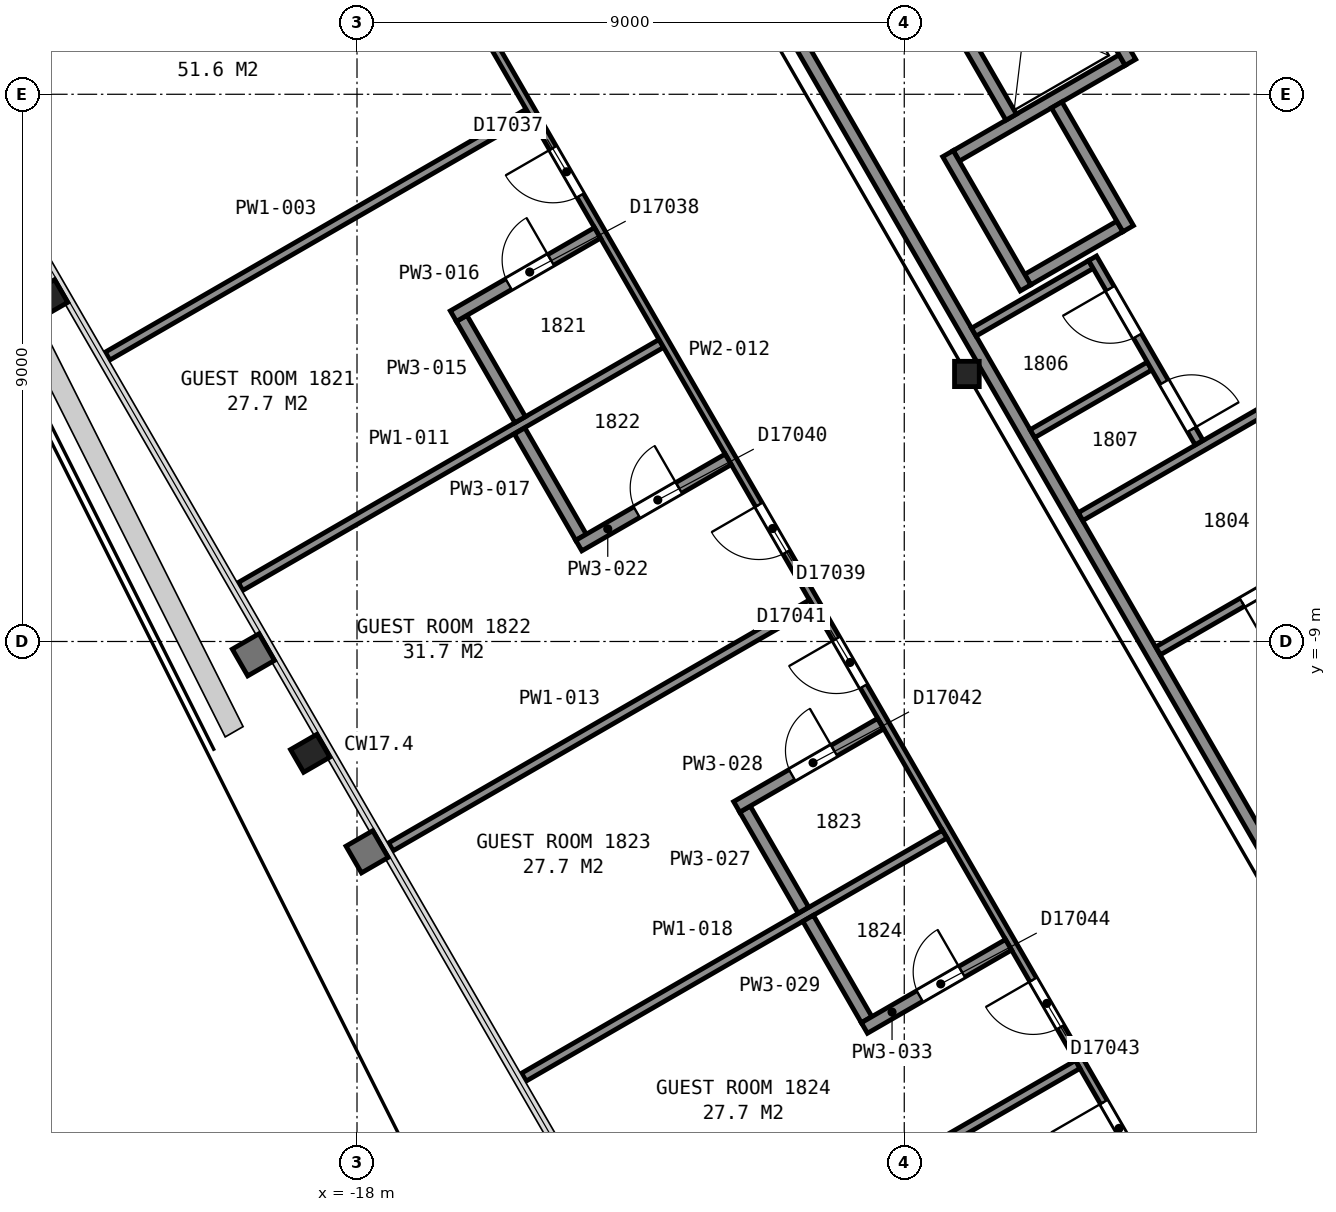
"""IFC4 building model, lengths in metres.
Left out: names, types, materials, properties, quantities, classifications, styles, units other than length and angle.
Written with IfcOpenShell. Run it as: python <this file> out.ifc"""

import sys

from ifc_helpers import new_model, si_unit, direction, frame, frame_2d, origin, origin_2d, place, context, subcontext, project, spatial, rectangle, i_section, extrude, element, fill, save


model = new_model("IFC4")
c1 = context("Model", 3, precision=1e-05, world=origin(), true_north=direction((0.0, 1.0)))
c2 = subcontext(c1, "Body", "Model", "MODEL_VIEW")
j1 = project(units=[si_unit("LENGTHUNIT", "METRE"), si_unit("PLANEANGLEUNIT", "RADIAN")], contexts=[c1])
p1 = place(None, origin())
s1 = spatial("IfcSite", under=j1, at=p1, CompositionType="ELEMENT")
p2 = place(p1, origin())
s2 = spatial("IfcBuilding", under=s1, at=p2, CompositionType="ELEMENT")
p3 = place(p2, frame((0.0, 0.0, 80.0)))
s3 = spatial("IfcBuildingStorey", under=s2, at=p3, CompositionType="ELEMENT", Elevation=80.0)
for number, where, z_axis, x_axis in (
    (1, (-23.08, -3.36, 0.0), (0.0, 0.0, 1.0), (-0.5, 0.866, 0.0)),
    (2, (-18.77, -10.84, 0.0), (0.0, 0.0, 1.0), (-0.5, 0.866, 0.0)),
):
    element("IfcColumn", number, at=place(p3, frame(where, z_axis=z_axis, x_axis=x_axis)), inside=s3, PredefinedType="COLUMN", context=c2, shape_type="SweptSolid", body=[
        extrude(i_section(OverallWidth=0.432, OverallDepth=0.498, WebThickness=0.056, FlangeThickness=0.089, FilletRadius=0.015, at=origin_2d()), origin(), (0.0, 0.0, 1.0), 3.6),
    ])
p4 = place(p3, frame((-7.97, -4.6, 0.0), z_axis=(0.0, 0.0, 1.0), x_axis=(1.0, 0.0, 0.0)))
e3 = element("IfcColumn", 3, at=p4, inside=s3, PredefinedType="COLUMN", context=c2, shape_type="SweptSolid", body=[
    extrude(i_section(OverallWidth=0.406, OverallDepth=0.417, WebThickness=0.03, FlangeThickness=0.048, FilletRadius=0.015, at=origin_2d()), origin(), (0.0, 0.0, 1.0), 3.6),
])
p5 = place(p3, frame((-6.97, -3.048, 0.0), z_axis=(0.0, 0.0, 1.0), x_axis=(0.866036909293, 0.499980071345, 0.0)))
e4 = element("IfcWall", 4, at=p5, inside=s3, PredefinedType="PARTITIONING", context=c2, shape_type="SweptSolid", body=[
    extrude(rectangle(XDim=1.75, YDim=0.2, at=frame_2d((0.875, 0.0))), origin(), (0.0, 0.0, 1.0), 3.6),
])
p6 = place(p3, frame((-8.145, -1.013, 0.0), z_axis=(0.0, 0.0, 1.0), x_axis=(0.866016494683, 0.500015430699, 0.0)))
e5 = element("IfcWall", 5, at=p6, inside=s3, PredefinedType="PARTITIONING", context=c2, shape_type="SweptSolid", body=[
    extrude(rectangle(XDim=3.15, YDim=0.2, at=frame_2d((1.575, 0.0))), origin(), (0.0, 0.0, 1.0), 3.6),
])
p7 = place(p3, frame((-5.28, 0.525, 0.0), z_axis=(0.0, 0.0, 1.0), x_axis=(-0.500037662692, 0.866003658127, 0.0)))
e6 = element("IfcWall", 6, at=p7, inside=s3, PredefinedType="PARTITIONING", context=c2, shape_type="SweptSolid", body=[
    extrude(rectangle(XDim=2.95, YDim=0.2, at=frame_2d((1.475, 0.0))), origin(), (0.0, 0.0, 1.0), 3.6),
])
p8 = place(p7, frame((0.925, 0.0, 0.0)))
e7 = element("IfcOpeningElement", 7, at=p8, cuts=e6, PredefinedType="OPENING", context=c2, shape_type="SweptSolid", body=[
    extrude(rectangle(XDim=1.1, YDim=2.1, at=frame_2d((0.55, 1.05))), frame((0.0, 0.11, 0.0), z_axis=(0.0, -1.0, 0.0), x_axis=(1.0, 0.0, 0.0)), (0.0, 0.0, 1.0), 0.22),
])
p9 = place(p3, frame((-5.318, -2.21, 0.0), z_axis=(0.0, 0.0, 1.0), x_axis=(-0.499938297808, 0.866061024631, 0.0)))
e8 = element("IfcWall", 8, at=p9, inside=s3, PredefinedType="PARTITIONING", context=c2, shape_type="SweptSolid", body=[
    extrude(rectangle(XDim=2.35, YDim=0.2, at=frame_2d((1.175, 0.0))), origin(), (0.0, 0.0, 1.0), 3.6),
])
p10 = place(p3, frame((-7.242, -0.376, 0.0), z_axis=(0.0, 0.0, 1.0), x_axis=(-0.499996545922, 0.866027397988, 0.0)))
e9 = element("IfcWall", 9, at=p10, inside=s3, PredefinedType="PARTITIONING", context=c2, shape_type="SweptSolid", body=[
    extrude(rectangle(XDim=2.75, YDim=0.2, at=frame_2d((1.375, 0.0))), origin(), (0.0, 0.0, 1.0), 3.6),
])
p11 = place(p3, frame((-7.006, -3.185, 0.0), z_axis=(0.0, 0.0, 1.0), x_axis=(-0.499990435942, 0.866030925526, 0.0)))
e10 = element("IfcWall", 10, at=p11, inside=s3, PredefinedType="PARTITIONING", context=c2, shape_type="SweptSolid", body=[
    extrude(rectangle(XDim=2.55, YDim=0.2, at=frame_2d((1.275, 0.0))), origin(), (0.0, 0.0, 1.0), 3.6),
])
p12 = place(p3, frame((-13.664, 5.946, 0.0), z_axis=(0.0, 0.0, 1.0), x_axis=(0.499994327219, -0.866028678941, 0.0)))
e11 = element("IfcWall", 11, at=p12, inside=s3, PredefinedType="PARTITIONING", context=c2, shape_type="SweptSolid", body=[
    extrude(rectangle(XDim=23.968, YDim=0.2, at=frame_2d((11.984, 0.0))), origin(), (0.0, 0.0, 1.0), 3.35),
])
p13 = place(p3, frame((-7.856, -3.912, 0.0), z_axis=(0.0, 0.0, 1.0), x_axis=(0.865971748, 0.500092923031, 0.0)))
e12 = element("IfcWall", 12, at=p13, inside=s3, PredefinedType="PARTITIONING", context=c2, shape_type="SweptSolid", body=[
    extrude(rectangle(XDim=2.225, YDim=0.15, at=frame_2d((1.112, 0.0))), origin(), (0.0, 0.0, 1.0), 3.35),
])
p14 = place(p3, frame((-6.892, -5.582, 0.0), z_axis=(0.0, 0.0, 1.0), x_axis=(0.865944298464, 0.500140452231, 0.0)))
e13 = element("IfcWall", 13, at=p14, inside=s3, PredefinedType="PARTITIONING", context=c2, shape_type="SweptSolid", body=[
    extrude(rectangle(XDim=2.224, YDim=0.15, at=frame_2d((1.112, 0.0))), origin(), (0.0, 0.0, 1.0), 3.35),
])
p15 = place(p3, frame((-6.1, -6.946, 0.0), z_axis=(0.0, 0.0, 1.0), x_axis=(0.866038200431, 0.499977834903, 0.0)))
e14 = element("IfcWall", 14, at=p15, inside=s3, PredefinedType="PARTITIONING", context=c2, shape_type="SweptSolid", body=[
    extrude(rectangle(XDim=4.22, YDim=0.15, at=frame_2d((2.11, 0.0))), origin(), (0.0, 0.0, 1.0), 3.35),
])
p16 = place(p3, frame((-4.152, -5.729, 0.0), z_axis=(0.0, 0.0, 1.0), x_axis=(-0.500024287448, 0.866011380966, 0.0)))
e15 = element("IfcWall", 15, at=p16, inside=s3, PredefinedType="PARTITIONING", context=c2, shape_type="SweptSolid", body=[
    extrude(rectangle(XDim=3.501, YDim=0.15, at=frame_2d((1.75, 0.0))), origin(), (0.0, 0.0, 1.0), 3.35),
])
p17 = place(p16, frame((2.026, 0.0, 0.0)))
e16 = element("IfcOpeningElement", 16, at=p17, cuts=e15, PredefinedType="OPENING", context=c2, shape_type="SweptSolid", body=[
    extrude(rectangle(XDim=0.9, YDim=2.1, at=frame_2d((0.45, 1.05))), frame((0.0, 0.085, 0.0), z_axis=(0.0, -1.0, 0.0), x_axis=(1.0, 0.0, 0.0)), (0.0, 0.0, 1.0), 0.17),
])
p18 = place(p16, frame((0.248, 0.0, 0.0)))
e17 = element("IfcOpeningElement", 17, at=p18, cuts=e15, PredefinedType="OPENING", context=c2, shape_type="SweptSolid", body=[
    extrude(rectangle(XDim=0.9, YDim=2.1, at=frame_2d((0.45, 1.05))), frame((0.0, 0.085, 0.0), z_axis=(0.0, -1.0, 0.0), x_axis=(1.0, 0.0, 0.0)), (0.0, 0.0, 1.0), 0.17),
])
p19 = place(p3, frame((-4.825, -9.154, 0.0), z_axis=(0.0, 0.0, 1.0), x_axis=(0.866023738697, 0.500002884005, 0.0)))
e18 = element("IfcWall", 18, at=p19, inside=s3, PredefinedType="PARTITIONING", context=c2, shape_type="SweptSolid", body=[
    extrude(rectangle(XDim=4.22, YDim=0.15, at=frame_2d((2.11, 0.0))), origin(), (0.0, 0.0, 1.0), 3.35),
])
p20 = place(p19, frame((1.595, 0.0, 0.0)))
e19 = element("IfcOpeningElement", 19, at=p20, cuts=e18, PredefinedType="OPENING", context=c2, shape_type="SweptSolid", body=[
    extrude(rectangle(XDim=0.9, YDim=2.1, at=frame_2d((0.45, 1.05))), frame((0.0, 0.085, 0.0), z_axis=(0.0, -1.0, 0.0), x_axis=(1.0, 0.0, 0.0)), (0.0, 0.0, 1.0), 0.17),
])
p21 = place(p3, frame((-22.103, -4.306, 0.0), z_axis=(0.0, 0.0, 1.0), x_axis=(0.866016576429, 0.500015289116, 0.0)))
e20 = element("IfcWall", 20, at=p21, inside=s3, PredefinedType="PARTITIONING", context=c2, shape_type="SweptSolid", body=[
    extrude(rectangle(XDim=7.987, YDim=0.15, at=frame_2d((3.993, 0.0))), origin(), (0.0, 0.0, 1.0), 2.613),
])
p22 = place(p3, frame((-19.916, -8.095, 0.0), z_axis=(0.0, 0.0, 1.0), x_axis=(0.865953574939, 0.500124390578, 0.0)))
e21 = element("IfcWall", 21, at=p22, inside=s3, PredefinedType="PARTITIONING", context=c2, shape_type="SweptSolid", body=[
    extrude(rectangle(XDim=7.992, YDim=0.15, at=frame_2d((3.996, 0.0))), origin(), (0.0, 0.0, 1.0), 2.613),
])
p23 = place(p3, frame((-3.766, -19.958, 0.0), z_axis=(0.0, 0.0, 1.0), x_axis=(-0.50002170027, 0.866012874765, 0.0)))
e22 = element("IfcWall", 22, at=p23, inside=s3, PredefinedType="PARTITIONING", context=c2, shape_type="SweptSolid", body=[
    extrude(rectangle(XDim=31.379, YDim=0.125, at=frame_2d((15.69, 0.0))), origin(), (0.0, 0.0, 1.0), 2.613),
])
p24 = place(p23, frame((25.28, 0.0, 0.0)))
e23 = element("IfcOpeningElement", 23, at=p24, cuts=e22, PredefinedType="OPENING", context=c2, shape_type="SweptSolid", body=[
    extrude(rectangle(XDim=1.5, YDim=2.1, at=frame_2d((0.75, 1.05))), frame((0.0, 0.073, 0.0), z_axis=(0.0, -1.0, 0.0), x_axis=(1.0, 0.0, 0.0)), (0.0, 0.0, 1.0), 0.145),
])
p25 = place(p23, frame((21.124, 0.0, 0.0)))
e24 = element("IfcOpeningElement", 24, at=p25, cuts=e22, PredefinedType="OPENING", context=c2, shape_type="SweptSolid", body=[
    extrude(rectangle(XDim=0.9, YDim=2.1, at=frame_2d((0.45, 1.05))), frame((0.0, 0.073, 0.0), z_axis=(0.0, -1.0, 0.0), x_axis=(1.0, 0.0, 0.0)), (0.0, 0.0, 1.0), 0.145),
])
p26 = place(p23, frame((14.349, 0.0, 0.0)))
e25 = element("IfcOpeningElement", 25, at=p26, cuts=e22, PredefinedType="OPENING", context=c2, shape_type="SweptSolid", body=[
    extrude(rectangle(XDim=0.9, YDim=2.1, at=frame_2d((0.45, 1.05))), frame((0.0, 0.073, 0.0), z_axis=(0.0, -1.0, 0.0), x_axis=(1.0, 0.0, 0.0)), (0.0, 0.0, 1.0), 0.145),
])
p27 = place(p23, frame((11.804, 0.0, 0.0)))
e26 = element("IfcOpeningElement", 26, at=p27, cuts=e22, PredefinedType="OPENING", context=c2, shape_type="SweptSolid", body=[
    extrude(rectangle(XDim=0.9, YDim=2.1, at=frame_2d((0.45, 1.05))), frame((0.0, 0.073, 0.0), z_axis=(0.0, -1.0, 0.0), x_axis=(1.0, 0.0, 0.0)), (0.0, 0.0, 1.0), 0.145),
])
p28 = place(p23, frame((5.33, 0.0, 0.0)))
e27 = element("IfcOpeningElement", 27, at=p28, cuts=e22, PredefinedType="OPENING", context=c2, shape_type="SweptSolid", body=[
    extrude(rectangle(XDim=0.9, YDim=2.1, at=frame_2d((0.45, 1.05))), frame((0.0, 0.073, 0.0), z_axis=(0.0, -1.0, 0.0), x_axis=(1.0, 0.0, 0.0)), (0.0, 0.0, 1.0), 0.145),
])
p29 = place(p23, frame((2.906, 0.0, 0.0)))
e28 = element("IfcOpeningElement", 28, at=p29, cuts=e22, PredefinedType="OPENING", context=c2, shape_type="SweptSolid", body=[
    extrude(rectangle(XDim=1.0, YDim=2.1, at=frame_2d((0.5, 1.05))), frame((0.0, 0.073, 0.0), z_axis=(0.0, -1.0, 0.0), x_axis=(1.0, 0.0, 0.0)), (0.0, 0.0, 1.0), 0.145),
])
p30 = place(p3, frame((-17.443, -12.377, 0.0), z_axis=(0.0, 0.0, 1.0), x_axis=(0.866021771655, 0.500006290979, 0.0)))
e29 = element("IfcWall", 29, at=p30, inside=s3, PredefinedType="PARTITIONING", context=c2, shape_type="SweptSolid", body=[
    extrude(rectangle(XDim=7.992, YDim=0.15, at=frame_2d((3.996, 0.0))), origin(), (0.0, 0.0, 1.0), 2.613),
])
p31 = place(p3, frame((-16.279, -3.686, 0.0), z_axis=(0.0, 0.0, 1.0), x_axis=(0.500190942922, -0.865915134767, 0.0)))
e30 = element("IfcWall", 30, at=p31, inside=s3, PredefinedType="PARTITIONING", context=c2, shape_type="SweptSolid", body=[
    extrude(rectangle(XDim=1.925, YDim=0.2, at=frame_2d((0.962, 0.0))), origin(), (0.0, 0.0, 1.0), 2.613),
])
p32 = place(p3, frame((-14.045, -2.28, 0.0), z_axis=(0.0, 0.0, 1.0), x_axis=(-0.866005850709, -0.50003386539, 0.0)))
e31 = element("IfcWall", 31, at=p32, inside=s3, PredefinedType="PARTITIONING", context=c2, shape_type="SweptSolid", body=[
    extrude(rectangle(XDim=2.737, YDim=0.2, at=frame_2d((1.369, 0.0))), origin(), (0.0, 0.0, 1.0), 2.613),
])
p33 = place(p32, frame((0.887, 0.0, 0.0)))
e32 = element("IfcOpeningElement", 32, at=p33, cuts=e31, PredefinedType="OPENING", context=c2, shape_type="SweptSolid", body=[
    extrude(rectangle(XDim=0.8, YDim=2.1, at=frame_2d((0.4, 1.05))), frame((0.0, 0.11, 0.0), z_axis=(0.0, -1.0, 0.0), x_axis=(1.0, 0.0, 0.0)), (0.0, 0.0, 1.0), 0.22),
])
p34 = place(p3, frame((-15.326, -5.536, 0.0), z_axis=(0.0, 0.0, 1.0), x_axis=(0.499868889286, -0.866101087359, 0.0)))
e33 = element("IfcWall", 33, at=p34, inside=s3, PredefinedType="PARTITIONING", context=c2, shape_type="SweptSolid", body=[
    extrude(rectangle(XDim=2.021, YDim=0.2, at=frame_2d((1.01, 0.0))), origin(), (0.0, 0.0, 1.0), 2.613),
])
p35 = place(p3, frame((-15.256, -16.165, 0.0), z_axis=(0.0, 0.0, 1.0), x_axis=(0.866008543052, 0.500029202507, 0.0)))
e34 = element("IfcWall", 34, at=p35, inside=s3, PredefinedType="PARTITIONING", context=c2, shape_type="SweptSolid", body=[
    extrude(rectangle(XDim=7.992, YDim=0.15, at=frame_2d((3.996, 0.0))), origin(), (0.0, 0.0, 1.0), 2.613),
])
p36 = place(p3, frame((-14.353, -7.423, 0.0), z_axis=(0.0, 0.0, 1.0), x_axis=(0.866010792954, 0.500025305846, 0.0)))
e35 = element("IfcWall", 35, at=p36, inside=s3, PredefinedType="PARTITIONING", context=c2, shape_type="SweptSolid", body=[
    extrude(rectangle(XDim=2.838, YDim=0.2, at=frame_2d((1.419, 0.0))), origin(), (0.0, 0.0, 1.0), 2.613),
])
p37 = place(p36, frame((1.1, 0.0, 0.0)))
e36 = element("IfcOpeningElement", 36, at=p37, cuts=e35, PredefinedType="OPENING", context=c2, shape_type="SweptSolid", body=[
    extrude(rectangle(XDim=0.8, YDim=2.1, at=frame_2d((0.4, 1.05))), frame((0.0, 0.11, 0.0), z_axis=(0.0, -1.0, 0.0), x_axis=(1.0, 0.0, 0.0)), (0.0, 0.0, 1.0), 0.22),
])
p38 = place(p3, frame((-13.069, -19.953, 0.0), z_axis=(0.0, 0.0, 1.0), x_axis=(0.866021771655, 0.500006290979, 0.0)))
e37 = element("IfcWall", 37, at=p38, inside=s3, PredefinedType="PARTITIONING", context=c2, shape_type="SweptSolid", body=[
    extrude(rectangle(XDim=7.992, YDim=0.15, at=frame_2d((3.996, 0.0))), origin(), (0.0, 0.0, 1.0), 2.613),
])
p39 = place(p3, frame((-11.619, -11.757, 0.0), z_axis=(0.0, 0.0, 1.0), x_axis=(0.500133489192, -0.865948320045, 0.0)))
e38 = element("IfcWall", 38, at=p39, inside=s3, PredefinedType="PARTITIONING", context=c2, shape_type="SweptSolid", body=[
    extrude(rectangle(XDim=1.919, YDim=0.2, at=frame_2d((0.96, 0.0))), origin(), (0.0, 0.0, 1.0), 2.613),
])
p40 = place(p3, frame((-9.389, -10.353, 0.0), z_axis=(0.0, 0.0, 1.0), x_axis=(-0.865858193421, -0.500289505072, 0.0)))
e39 = element("IfcWall", 39, at=p40, inside=s3, PredefinedType="PARTITIONING", context=c2, shape_type="SweptSolid", body=[
    extrude(rectangle(XDim=2.733, YDim=0.2, at=frame_2d((1.366, 0.0))), origin(), (0.0, 0.0, 1.0), 2.613),
])
p41 = place(p40, frame((0.883, 0.0, 0.0)))
e40 = element("IfcOpeningElement", 40, at=p41, cuts=e39, PredefinedType="OPENING", context=c2, shape_type="SweptSolid", body=[
    extrude(rectangle(XDim=0.8, YDim=2.1, at=frame_2d((0.4, 1.05))), frame((0.0, 0.11, 0.0), z_axis=(0.0, -1.0, 0.0), x_axis=(1.0, 0.0, 0.0)), (0.0, 0.0, 1.0), 0.22),
])
p42 = place(p3, frame((-10.582, -13.553, 0.0), z_axis=(0.0, 0.0, 1.0), x_axis=(0.499971247393, -0.866042003473, 0.0)))
e41 = element("IfcWall", 41, at=p42, inside=s3, PredefinedType="PARTITIONING", context=c2, shape_type="SweptSolid", body=[
    extrude(rectangle(XDim=1.925, YDim=0.2, at=frame_2d((0.963, 0.0))), origin(), (0.0, 0.0, 1.0), 2.613),
])
p43 = place(p3, frame((-9.656, -15.357, 0.0), z_axis=(0.0, 0.0, 1.0), x_axis=(0.866005850709, 0.50003386539, 0.0)))
e42 = element("IfcWall", 42, at=p43, inside=s3, PredefinedType="PARTITIONING", context=c2, shape_type="SweptSolid", body=[
    extrude(rectangle(XDim=2.737, YDim=0.2, at=frame_2d((1.369, 0.0))), origin(), (0.0, 0.0, 1.0), 2.613),
])
p44 = place(p43, frame((1.05, 0.0, 0.0)))
e43 = element("IfcOpeningElement", 43, at=p44, cuts=e42, PredefinedType="OPENING", context=c2, shape_type="SweptSolid", body=[
    extrude(rectangle(XDim=0.8, YDim=2.1, at=frame_2d((0.4, 1.05))), frame((0.0, 0.11, 0.0), z_axis=(0.0, -1.0, 0.0), x_axis=(1.0, 0.0, 0.0)), (0.0, 0.0, 1.0), 0.22),
])
p45 = place(p17, origin())
e44 = element("IfcDoor", 44, at=p45, inside=s3, OperationType="SINGLE_SWING_RIGHT", PredefinedType="DOOR", context=c2, shape_type="SweptSolid", body=[
    extrude(rectangle(XDim=0.9, YDim=2.1, at=frame_2d((0.45, 1.05))), frame((0.0, 0.025, 0.0), z_axis=(0.0, -1.0, 0.0), x_axis=(1.0, 0.0, 0.0)), (0.0, 0.0, 1.0), 0.05),
])
fill(e16, e44)
p46 = place(p18, origin())
e45 = element("IfcDoor", 45, at=p46, inside=s3, OperationType="SINGLE_SWING_LEFT", PredefinedType="DOOR", context=c2, shape_type="SweptSolid", body=[
    extrude(rectangle(XDim=0.9, YDim=2.1, at=frame_2d((0.45, 1.05))), frame((0.0, 0.025, 0.0), z_axis=(0.0, -1.0, 0.0), x_axis=(1.0, 0.0, 0.0)), (0.0, 0.0, 1.0), 0.05),
])
fill(e17, e45)
p47 = place(p20, origin())
e46 = element("IfcDoor", 46, at=p47, inside=s3, OperationType="SINGLE_SWING_LEFT", PredefinedType="DOOR", context=c2, shape_type="SweptSolid", body=[
    extrude(rectangle(XDim=0.9, YDim=2.1, at=frame_2d((0.45, 1.05))), frame((0.0, 0.025, 0.0), z_axis=(0.0, -1.0, 0.0), x_axis=(1.0, 0.0, 0.0)), (0.0, 0.0, 1.0), 0.05),
])
fill(e19, e46)
p48 = place(p25, origin())
e47 = element("IfcDoor", 47, at=p48, inside=s3, OperationType="SINGLE_SWING_RIGHT", PredefinedType="DOOR", context=c2, shape_type="SweptSolid", body=[
    extrude(rectangle(XDim=0.9, YDim=2.1, at=frame_2d((0.45, 1.05))), frame((0.0, 0.025, 0.0), z_axis=(0.0, -1.0, 0.0), x_axis=(1.0, 0.0, 0.0)), (0.0, 0.0, 1.0), 0.05),
])
fill(e24, e47)
p49 = place(p26, origin())
e48 = element("IfcDoor", 48, at=p49, inside=s3, OperationType="SINGLE_SWING_RIGHT", PredefinedType="DOOR", context=c2, shape_type="SweptSolid", body=[
    extrude(rectangle(XDim=0.9, YDim=2.1, at=frame_2d((0.45, 1.05))), frame((0.0, 0.025, 0.0), z_axis=(0.0, -1.0, 0.0), x_axis=(1.0, 0.0, 0.0)), (0.0, 0.0, 1.0), 0.05),
])
fill(e25, e48)
p50 = place(p27, origin())
e49 = element("IfcDoor", 49, at=p50, inside=s3, OperationType="SINGLE_SWING_RIGHT", PredefinedType="DOOR", context=c2, shape_type="SweptSolid", body=[
    extrude(rectangle(XDim=0.9, YDim=2.1, at=frame_2d((0.45, 1.05))), frame((0.0, 0.025, 0.0), z_axis=(0.0, -1.0, 0.0), x_axis=(1.0, 0.0, 0.0)), (0.0, 0.0, 1.0), 0.05),
])
fill(e26, e49)
p51 = place(p28, origin())
e50 = element("IfcDoor", 50, at=p51, inside=s3, OperationType="SINGLE_SWING_RIGHT", PredefinedType="DOOR", context=c2, shape_type="SweptSolid", body=[
    extrude(rectangle(XDim=0.9, YDim=2.1, at=frame_2d((0.45, 1.05))), frame((0.0, 0.025, 0.0), z_axis=(0.0, -1.0, 0.0), x_axis=(1.0, 0.0, 0.0)), (0.0, 0.0, 1.0), 0.05),
])
fill(e27, e50)
p52 = place(p29, origin())
e51 = element("IfcDoor", 51, at=p52, inside=s3, OperationType="SINGLE_SWING_RIGHT", PredefinedType="DOOR", context=c2, shape_type="SweptSolid", body=[
    extrude(rectangle(XDim=1.0, YDim=2.1, at=frame_2d((0.5, 1.05))), frame((0.0, 0.025, 0.0), z_axis=(0.0, -1.0, 0.0), x_axis=(1.0, 0.0, 0.0)), (0.0, 0.0, 1.0), 0.05),
])
fill(e28, e51)
p53 = place(p33, origin())
e52 = element("IfcDoor", 52, at=p53, inside=s3, OperationType="SINGLE_SWING_LEFT", PredefinedType="DOOR", context=c2, shape_type="SweptSolid", body=[
    extrude(rectangle(XDim=0.8, YDim=2.1, at=frame_2d((0.4, 1.05))), frame((0.0, 0.025, 0.0), z_axis=(0.0, -1.0, 0.0), x_axis=(1.0, 0.0, 0.0)), (0.0, 0.0, 1.0), 0.05),
])
fill(e32, e52)
p54 = place(p37, origin())
e53 = element("IfcDoor", 53, at=p54, inside=s3, OperationType="SINGLE_SWING_RIGHT", PredefinedType="DOOR", context=c2, shape_type="SweptSolid", body=[
    extrude(rectangle(XDim=0.8, YDim=2.1, at=frame_2d((0.4, 1.05))), frame((0.0, 0.025, 0.0), z_axis=(0.0, -1.0, 0.0), x_axis=(1.0, 0.0, 0.0)), (0.0, 0.0, 1.0), 0.05),
])
fill(e36, e53)
p55 = place(p41, origin())
e54 = element("IfcDoor", 54, at=p55, inside=s3, OperationType="SINGLE_SWING_LEFT", PredefinedType="DOOR", context=c2, shape_type="SweptSolid", body=[
    extrude(rectangle(XDim=0.8, YDim=2.1, at=frame_2d((0.4, 1.05))), frame((0.0, 0.025, 0.0), z_axis=(0.0, -1.0, 0.0), x_axis=(1.0, 0.0, 0.0)), (0.0, 0.0, 1.0), 0.05),
])
fill(e40, e54)
p56 = place(p44, origin())
e55 = element("IfcDoor", 55, at=p56, inside=s3, OperationType="SINGLE_SWING_RIGHT", PredefinedType="DOOR", context=c2, shape_type="SweptSolid", body=[
    extrude(rectangle(XDim=0.8, YDim=2.1, at=frame_2d((0.4, 1.05))), frame((0.0, 0.025, 0.0), z_axis=(0.0, -1.0, 0.0), x_axis=(1.0, 0.0, 0.0)), (0.0, 0.0, 1.0), 0.05),
])
fill(e43, e55)
save(model, sys.argv[1])
